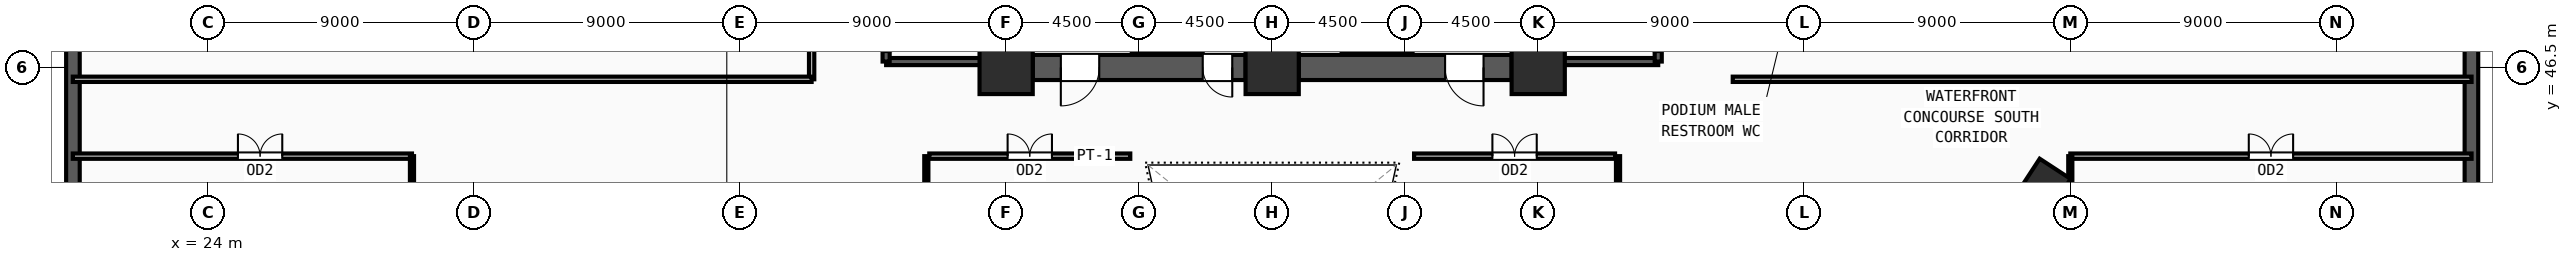
"""IFC4 building model, lengths in metres.
Left out: names, types, materials, properties, quantities, classifications, styles, units other than length and angle.
Written with IfcOpenShell. Run it as: python <this file> out.ifc"""

import sys

from ifc_helpers import new_model, si_unit, direction, frame, frame_2d, origin, origin_2d, place, context, subcontext, project, spatial, rectangle, extrude, source, transform, mapped, element, fill, save


model = new_model("IFC4")
c1 = context("Model", 3, precision=1e-05, world=origin(), true_north=direction((0.0, 1.0)))
c2 = subcontext(c1, "Body", "Model", "MODEL_VIEW")
j1 = project(units=[si_unit("LENGTHUNIT", "METRE"), si_unit("PLANEANGLEUNIT", "RADIAN")], contexts=[c1])
p1 = place(None, origin())
s1 = spatial("IfcSite", under=j1, at=p1, CompositionType="ELEMENT")
p2 = place(p1, origin())
s2 = spatial("IfcBuilding", under=s1, at=p2, CompositionType="ELEMENT")
p3 = place(p2, frame((0.0, 0.0, 14.4)))
s3 = spatial("IfcBuildingStorey", under=s2, at=p3, CompositionType="ELEMENT", Elevation=14.4)
m1 = source(origin(), c2, "Body", "SweptSolid", [
    extrude(rectangle(XDim=1.8, YDim=1.8, at=origin_2d()), origin(), (0.0, 0.0, 1.0), 4.5),
])
for number, where, z_axis, x_axis in (
    (1, (51.0, 46.5, 0.0), (0.0, 0.0, 1.0), (1.0, 0.0, 0.0)),
    (2, (60.0, 46.5, 0.0), (0.0, 0.0, 1.0), (1.0, 0.0, 0.0)),
    (3, (69.0, 46.5, 0.0), (0.0, 0.0, 1.0), (1.0, 0.0, 0.0)),
):
    element("IfcColumn", number, at=place(p3, frame(where, z_axis=z_axis, x_axis=x_axis)), inside=s3, PredefinedType="COLUMN", context=c2, shape_type="MappedRepresentation", body=[
        mapped(m1, transform((0.0, 0.0, 0.0), x_axis=(1.0, 0.0, 0.0), y_axis=(0.0, 1.0, 0.0), z_axis=(0.0, 0.0, 1.0), scale=1.0)),
    ])
m2 = source(origin(), c2, "Body", "SweptSolid", [
    extrude(rectangle(XDim=1.55, YDim=1.25, at=origin_2d()), origin(), (0.0, 0.0, 1.0), 4.5),
])
p4 = place(p3, frame((86.064, 42.423, 0.0), z_axis=(0.0, 0.0, 1.0), x_axis=(0.546978918409, 0.837146380758, 0.0)))
e4 = element("IfcColumn", 4, at=p4, inside=s3, PredefinedType="COLUMN", context=c2, shape_type="MappedRepresentation", body=[
    mapped(m2, transform((0.0, 0.0, 0.0), x_axis=(1.0, 0.0, 0.0), y_axis=(0.0, 1.0, 0.0), z_axis=(0.0, 0.0, 1.0), scale=1.0)),
])
p5 = place(p3, frame((100.57, 20.54, 0.0), z_axis=(0.0, 0.0, 1.0), x_axis=(0.0, 1.0, 0.0)))
e5 = element("IfcWall", 5, at=p5, inside=s3, PredefinedType="SOLIDWALL", context=c2, shape_type="SweptSolid", body=[
    extrude(rectangle(XDim=66.23, YDim=0.46, at=frame_2d((33.115, 0.0))), origin(), (0.0, 0.0, 1.0), 4.25),
])
m3 = source(origin(), c2, "Body", "SweptSolid", [
    extrude(rectangle(XDim=2.7, YDim=2.35, at=frame_2d((1.35, 1.175))), frame((0.0, 0.24, 0.0), z_axis=(0.0, -1.0, 0.0), x_axis=(1.0, 0.0, 0.0)), (0.0, 0.0, 1.0), 0.48),
])
p6 = place(p5, frame((8.111, 0.0, 0.55)))
e6 = element("IfcOpeningElement", 6, at=p6, cuts=e5, PredefinedType="OPENING", context=c2, shape_type="MappedRepresentation", body=[
    mapped(m3, transform((0.0, 0.0, 0.0), x_axis=(1.0, 0.0, 0.0), y_axis=(0.0, 1.0, 0.0), z_axis=(0.0, 0.0, 1.0), scale=1.0)),
])
p7 = place(p5, frame((17.573, 0.0, 0.55)))
e7 = element("IfcOpeningElement", 7, at=p7, cuts=e5, PredefinedType="OPENING", context=c2, shape_type="MappedRepresentation", body=[
    mapped(m3, transform((0.0, 0.0, 0.0), x_axis=(1.0, 0.0, 0.0), y_axis=(0.0, 1.0, 0.0), z_axis=(0.0, 0.0, 1.0), scale=1.0)),
])
p8 = place(p5, frame((27.034, 0.0, 0.55)))
e8 = element("IfcOpeningElement", 8, at=p8, cuts=e5, PredefinedType="OPENING", context=c2, shape_type="MappedRepresentation", body=[
    mapped(m3, transform((0.0, 0.0, 0.0), x_axis=(1.0, 0.0, 0.0), y_axis=(0.0, 1.0, 0.0), z_axis=(0.0, 0.0, 1.0), scale=1.0)),
])
p9 = place(p5, frame((36.496, 0.0, 0.55)))
e9 = element("IfcOpeningElement", 9, at=p9, cuts=e5, PredefinedType="OPENING", context=c2, shape_type="MappedRepresentation", body=[
    mapped(m3, transform((0.0, 0.0, 0.0), x_axis=(1.0, 0.0, 0.0), y_axis=(0.0, 1.0, 0.0), z_axis=(0.0, 0.0, 1.0), scale=1.0)),
])
p10 = place(p5, frame((55.419, 0.0, 0.55)))
e10 = element("IfcOpeningElement", 10, at=p10, cuts=e5, PredefinedType="OPENING", context=c2, shape_type="MappedRepresentation", body=[
    mapped(m3, transform((0.0, 0.0, 0.0), x_axis=(1.0, 0.0, 0.0), y_axis=(0.0, 1.0, 0.0), z_axis=(0.0, 0.0, 1.0), scale=1.0)),
])
p11 = place(p3, frame((19.43, 86.77, 0.0), z_axis=(0.0, 0.0, 1.0), x_axis=(0.0, -1.0, 0.0)))
e11 = element("IfcWall", 11, at=p11, inside=s3, PredefinedType="SOLIDWALL", context=c2, shape_type="SweptSolid", body=[
    extrude(rectangle(XDim=66.23, YDim=0.46, at=frame_2d((33.115, 0.0))), origin(), (0.0, 0.0, 1.0), 4.25),
])
p12 = place(p11, frame((8.111, 0.0, 0.55)))
e12 = element("IfcOpeningElement", 12, at=p12, cuts=e11, PredefinedType="OPENING", context=c2, shape_type="MappedRepresentation", body=[
    mapped(m3, transform((0.0, 0.0, 0.0), x_axis=(1.0, 0.0, 0.0), y_axis=(0.0, 1.0, 0.0), z_axis=(0.0, 0.0, 1.0), scale=1.0)),
])
p13 = place(p11, frame((27.034, 0.0, 0.55)))
e13 = element("IfcOpeningElement", 13, at=p13, cuts=e11, PredefinedType="OPENING", context=c2, shape_type="MappedRepresentation", body=[
    mapped(m3, transform((0.0, 0.0, 0.0), x_axis=(1.0, 0.0, 0.0), y_axis=(0.0, 1.0, 0.0), z_axis=(0.0, 0.0, 1.0), scale=1.0)),
])
p14 = place(p11, frame((36.496, 0.0, 0.55)))
e14 = element("IfcOpeningElement", 14, at=p14, cuts=e11, PredefinedType="OPENING", context=c2, shape_type="MappedRepresentation", body=[
    mapped(m3, transform((0.0, 0.0, 0.0), x_axis=(1.0, 0.0, 0.0), y_axis=(0.0, 1.0, 0.0), z_axis=(0.0, 0.0, 1.0), scale=1.0)),
])
p15 = place(p11, frame((45.957, 0.0, 0.55)))
e15 = element("IfcOpeningElement", 15, at=p15, cuts=e11, PredefinedType="OPENING", context=c2, shape_type="MappedRepresentation", body=[
    mapped(m3, transform((0.0, 0.0, 0.0), x_axis=(1.0, 0.0, 0.0), y_axis=(0.0, 1.0, 0.0), z_axis=(0.0, 0.0, 1.0), scale=1.0)),
])
p16 = place(p11, frame((55.419, 0.0, 0.55)))
e16 = element("IfcOpeningElement", 16, at=p16, cuts=e11, PredefinedType="OPENING", context=c2, shape_type="MappedRepresentation", body=[
    mapped(m3, transform((0.0, 0.0, 0.0), x_axis=(1.0, 0.0, 0.0), y_axis=(0.0, 1.0, 0.0), z_axis=(0.0, 0.0, 1.0), scale=1.0)),
])
p17 = place(p3, frame((68.1, 46.5, 0.0), z_axis=(0.0, 0.0, 1.0), x_axis=(-1.0, 0.0, 0.0)))
e17 = element("IfcWall", 17, at=p17, inside=s3, PredefinedType="SHEAR", context=c2, shape_type="SweptSolid", body=[
    extrude(rectangle(XDim=7.2, YDim=0.85, at=frame_2d((3.6, 0.0))), origin(), (0.0, 0.0, 1.0), 4.25),
])
m4 = source(origin(), c2, "Body", "SweptSolid", [
    extrude(rectangle(XDim=1.3, YDim=2.2, at=frame_2d((0.65, 1.1))), frame((0.0, 0.435, 0.0), z_axis=(0.0, -1.0, 0.0), x_axis=(1.0, 0.0, 0.0)), (0.0, 0.0, 1.0), 0.87),
])
p18 = place(p17, frame((0.95, 0.0, 0.0)))
e18 = element("IfcOpeningElement", 18, at=p18, cuts=e17, PredefinedType="OPENING", context=c2, shape_type="MappedRepresentation", body=[
    mapped(m4, transform((0.0, 0.0, 0.0), x_axis=(1.0, 0.0, 0.0), y_axis=(0.0, 1.0, 0.0), z_axis=(0.0, 0.0, 1.0), scale=1.0)),
])
p19 = place(p3, frame((59.1, 46.5, 0.0), z_axis=(0.0, 0.0, 1.0), x_axis=(-1.0, 0.0, 0.0)))
e19 = element("IfcWall", 19, at=p19, inside=s3, PredefinedType="SHEAR", context=c2, shape_type="SweptSolid", body=[
    extrude(rectangle(XDim=7.2, YDim=0.85, at=frame_2d((3.6, 0.0))), origin(), (0.0, 0.0, 1.0), 4.25),
])
p20 = place(p19, frame((4.95, 0.0, 0.0)))
e20 = element("IfcOpeningElement", 20, at=p20, cuts=e19, PredefinedType="OPENING", context=c2, shape_type="MappedRepresentation", body=[
    mapped(m4, transform((0.0, 0.0, 0.0), x_axis=(1.0, 0.0, 0.0), y_axis=(0.0, 1.0, 0.0), z_axis=(0.0, 0.0, 1.0), scale=1.0)),
])
m5 = source(origin(), c2, "Body", "SweptSolid", [
    extrude(rectangle(XDim=1.0, YDim=2.2, at=frame_2d((0.5, 1.1))), frame((0.0, 0.435, 0.0), z_axis=(0.0, -1.0, 0.0), x_axis=(1.0, 0.0, 0.0)), (0.0, 0.0, 1.0), 0.87),
])
p21 = place(p19, frame((0.45, 0.0, 0.0)))
e21 = element("IfcOpeningElement", 21, at=p21, cuts=e19, PredefinedType="OPENING", context=c2, shape_type="MappedRepresentation", body=[
    mapped(m5, transform((0.0, 0.0, 0.0), x_axis=(1.0, 0.0, 0.0), y_axis=(0.0, 1.0, 0.0), z_axis=(0.0, 0.0, 1.0), scale=1.0)),
])
p22 = place(p3, frame((46.94, 46.7, 0.0), z_axis=(0.0, 0.0, 1.0), x_axis=(1.0, 0.0, 0.0)))
e22 = element("IfcWall", 22, at=p22, inside=s3, PredefinedType="SOLIDWALL", context=c2, shape_type="SweptSolid", body=[
    extrude(rectangle(XDim=3.44, YDim=0.24, at=frame_2d((1.72, 0.0))), origin(), (0.0, 0.0, 1.0), 4.25),
])
p23 = place(p3, frame((50.38, 46.7, 0.0), z_axis=(0.0, 0.0, 1.0), x_axis=(0.0, 1.0, 0.0)))
e23 = element("IfcWall", 23, at=p23, inside=s3, PredefinedType="SOLIDWALL", context=c2, shape_type="SweptSolid", body=[
    extrude(rectangle(XDim=7.82, YDim=0.24, at=frame_2d((3.91, 0.0))), origin(), (0.0, 0.0, 1.0), 4.25),
])
p24 = place(p3, frame((46.94, 54.52, 0.0), z_axis=(0.0, 0.0, 1.0), x_axis=(0.0, -1.0, 0.0)))
e24 = element("IfcWall", 24, at=p24, inside=s3, PredefinedType="SOLIDWALL", context=c2, shape_type="SweptSolid", body=[
    extrude(rectangle(XDim=7.82, YDim=0.24, at=frame_2d((3.91, 0.0))), origin(), (0.0, 0.0, 1.0), 4.25),
])
m6 = source(origin(), c2, "Body", "SweptSolid", [
    extrude(rectangle(XDim=1.2, YDim=2.2, at=frame_2d((0.6, 1.1))), frame((0.0, 0.13, 0.0), z_axis=(0.0, -1.0, 0.0), x_axis=(1.0, 0.0, 0.0)), (0.0, 0.0, 1.0), 0.26),
])
p25 = place(p24, frame((6.3, 0.0, 0.0)))
e25 = element("IfcOpeningElement", 25, at=p25, cuts=e24, PredefinedType="OPENING", context=c2, shape_type="MappedRepresentation", body=[
    mapped(m6, transform((0.0, 0.0, 0.0), x_axis=(1.0, 0.0, 0.0), y_axis=(0.0, 1.0, 0.0), z_axis=(0.0, 0.0, 1.0), scale=1.0)),
])
p26 = place(p3, frame((69.62, 46.7, 0.0), z_axis=(0.0, 0.0, 1.0), x_axis=(1.0, 0.0, 0.0)))
e26 = element("IfcWall", 26, at=p26, inside=s3, PredefinedType="SOLIDWALL", context=c2, shape_type="SweptSolid", body=[
    extrude(rectangle(XDim=3.44, YDim=0.24, at=frame_2d((1.72, 0.0))), origin(), (0.0, 0.0, 1.0), 4.25),
])
p27 = place(p3, frame((73.06, 46.7, 0.0), z_axis=(0.0, 0.0, 1.0), x_axis=(0.0, 1.0, 0.0)))
e27 = element("IfcWall", 27, at=p27, inside=s3, PredefinedType="SOLIDWALL", context=c2, shape_type="SweptSolid", body=[
    extrude(rectangle(XDim=7.82, YDim=0.24, at=frame_2d((3.91, 0.0))), origin(), (0.0, 0.0, 1.0), 4.25),
])
p28 = place(p27, frame((0.32, 0.0, 0.0)))
e28 = element("IfcOpeningElement", 28, at=p28, cuts=e27, PredefinedType="OPENING", context=c2, shape_type="MappedRepresentation", body=[
    mapped(m6, transform((0.0, 0.0, 0.0), x_axis=(1.0, 0.0, 0.0), y_axis=(0.0, 1.0, 0.0), z_axis=(0.0, 0.0, 1.0), scale=1.0)),
])
p29 = place(p3, frame((69.62, 54.52, 0.0), z_axis=(0.0, 0.0, 1.0), x_axis=(0.0, -1.0, 0.0)))
e29 = element("IfcWall", 29, at=p29, inside=s3, PredefinedType="SOLIDWALL", context=c2, shape_type="SweptSolid", body=[
    extrude(rectangle(XDim=7.82, YDim=0.24, at=frame_2d((3.91, 0.0))), origin(), (0.0, 0.0, 1.0), 4.25),
])
p30 = place(p3, frame((48.4, 43.5, 0.0), z_axis=(0.0, 0.0, 1.0), x_axis=(1.0, 0.0, 0.0)))
e30 = element("IfcWall", 30, at=p30, inside=s3, PredefinedType="PARTITIONING", context=c2, shape_type="SweptSolid", body=[
    extrude(rectangle(XDim=6.8, YDim=0.18, at=frame_2d((3.4, 0.0))), origin(), (0.0, 0.0, 1.0), 4.25),
])
m7 = source(origin(), c2, "Body", "SweptSolid", [
    extrude(rectangle(XDim=1.5, YDim=2.2, at=frame_2d((0.75, 1.1))), frame((0.0, 0.1, 0.0), z_axis=(0.0, -1.0, 0.0), x_axis=(1.0, 0.0, 0.0)), (0.0, 0.0, 1.0), 0.2),
])
p31 = place(p30, frame((2.65, 0.0, 0.0)))
e31 = element("IfcOpeningElement", 31, at=p31, cuts=e30, PredefinedType="OPENING", context=c2, shape_type="MappedRepresentation", body=[
    mapped(m7, transform((0.0, 0.0, 0.0), x_axis=(1.0, 0.0, 0.0), y_axis=(0.0, 1.0, 0.0), z_axis=(0.0, 0.0, 1.0), scale=1.0)),
])
p32 = place(p3, frame((64.8, 43.5, 0.0), z_axis=(0.0, 0.0, 1.0), x_axis=(1.0, 0.0, 0.0)))
e32 = element("IfcWall", 32, at=p32, inside=s3, PredefinedType="PARTITIONING", context=c2, shape_type="SweptSolid", body=[
    extrude(rectangle(XDim=6.8, YDim=0.18, at=frame_2d((3.4, 0.0))), origin(), (0.0, 0.0, 1.0), 4.25),
])
p33 = place(p32, frame((2.65, 0.0, 0.0)))
e33 = element("IfcOpeningElement", 33, at=p33, cuts=e32, PredefinedType="OPENING", context=c2, shape_type="MappedRepresentation", body=[
    mapped(m7, transform((0.0, 0.0, 0.0), x_axis=(1.0, 0.0, 0.0), y_axis=(0.0, 1.0, 0.0), z_axis=(0.0, 0.0, 1.0), scale=1.0)),
])
p34 = place(p3, frame((19.425, 43.5, 0.0), z_axis=(0.0, 0.0, 1.0), x_axis=(1.0, 0.0, 0.0)))
e34 = element("IfcWall", 34, at=p34, inside=s3, PredefinedType="PARTITIONING", context=c2, shape_type="SweptSolid", body=[
    extrude(rectangle(XDim=11.475, YDim=0.18, at=frame_2d((5.737, 0.0))), origin(), (0.0, 0.0, 1.0), 4.25),
])
p35 = place(p34, frame((5.587, 0.0, 0.0)))
e35 = element("IfcOpeningElement", 35, at=p35, cuts=e34, PredefinedType="OPENING", context=c2, shape_type="MappedRepresentation", body=[
    mapped(m7, transform((0.0, 0.0, 0.0), x_axis=(1.0, 0.0, 0.0), y_axis=(0.0, 1.0, 0.0), z_axis=(0.0, 0.0, 1.0), scale=1.0)),
])
p36 = place(p3, frame((87.0, 43.5, 0.0), z_axis=(0.0, 0.0, 1.0), x_axis=(1.0, 0.0, 0.0)))
e36 = element("IfcWall", 36, at=p36, inside=s3, PredefinedType="PARTITIONING", context=c2, shape_type="SweptSolid", body=[
    extrude(rectangle(XDim=13.575, YDim=0.18, at=frame_2d((6.788, 0.0))), origin(), (0.0, 0.0, 1.0), 4.25),
])
p37 = place(p36, frame((6.038, 0.0, 0.0)))
e37 = element("IfcOpeningElement", 37, at=p37, cuts=e36, PredefinedType="OPENING", context=c2, shape_type="MappedRepresentation", body=[
    mapped(m7, transform((0.0, 0.0, 0.0), x_axis=(1.0, 0.0, 0.0), y_axis=(0.0, 1.0, 0.0), z_axis=(0.0, 0.0, 1.0), scale=1.0)),
])
p38 = place(p3, frame((44.42, 46.1, 0.0), z_axis=(0.0, 0.0, 1.0), x_axis=(0.0, 1.0, 0.0)))
e38 = element("IfcWall", 38, at=p38, inside=s3, PredefinedType="PARTITIONING", context=c2, shape_type="SweptSolid", body=[
    extrude(rectangle(XDim=22.0, YDim=0.18, at=frame_2d((11.0, 0.0))), origin(), (0.0, 0.0, 1.0), 4.25),
])
p39 = place(p38, frame((10.25, 0.0, 0.0)))
e39 = element("IfcOpeningElement", 39, at=p39, cuts=e38, PredefinedType="OPENING", context=c2, shape_type="MappedRepresentation", body=[
    mapped(m7, transform((0.0, 0.0, 0.0), x_axis=(1.0, 0.0, 0.0), y_axis=(0.0, 1.0, 0.0), z_axis=(0.0, 0.0, 1.0), scale=1.0)),
])
for number, where, z_axis, x_axis in (
    (40, (19.425, 46.1, 0.0), (0.0, 0.0, 1.0), (1.0, 0.0, 0.0)),
    (41, (75.58, 46.1, 0.0), (0.0, 0.0, 1.0), (1.0, 0.0, 0.0)),
):
    element("IfcWall", number, at=place(p3, frame(where, z_axis=z_axis, x_axis=x_axis)), inside=s3, PredefinedType="PARTITIONING", context=c2, shape_type="SweptSolid", body=[
        extrude(rectangle(XDim=24.995, YDim=0.18, at=frame_2d((12.498, 0.0))), origin(), (0.0, 0.0, 1.0), 4.25),
    ])
for number, where, z_axis, x_axis in (
    (42, (30.9, 19.425, 0.0), (0.0, 0.0, 1.0), (0.0, 1.0, 0.0)),
    (43, (87.0, 19.425, 0.0), (0.0, 0.0, 1.0), (0.0, 1.0, 0.0)),
    (44, (48.3, 19.425, 0.0), (0.0, 0.0, 1.0), (0.0, 1.0, 0.0)),
    (45, (71.7, 19.425, 0.0), (0.0, 0.0, 1.0), (0.0, 1.0, 0.0)),
):
    element("IfcWall", number, at=place(p3, frame(where, z_axis=z_axis, x_axis=x_axis)), inside=s3, PredefinedType="PARTITIONING", context=c2, shape_type="SweptSolid", body=[
        extrude(rectangle(XDim=24.075, YDim=0.14, at=frame_2d((12.038, 0.0))), origin(), (0.0, 0.0, 1.0), 4.25),
    ])
m8 = source(origin(), c2, "Body", "SweptSolid", [
    extrude(rectangle(XDim=1.3, YDim=2.2, at=frame_2d((0.65, 1.1))), frame((0.0, 0.025, 0.0), z_axis=(0.0, -1.0, 0.0), x_axis=(1.0, 0.0, 0.0)), (0.0, 0.0, 1.0), 0.05),
])
p40 = place(p20, origin())
e46 = element("IfcDoor", 46, at=p40, inside=s3, OperationType="SINGLE_SWING_RIGHT", PredefinedType="DOOR", context=c2, shape_type="MappedRepresentation", body=[
    mapped(m8, transform((0.0, 0.0, 0.0), x_axis=(1.0, 0.0, 0.0), y_axis=(0.0, 1.0, 0.0), z_axis=(0.0, 0.0, 1.0), scale=1.0)),
])
fill(e20, e46)
m9 = source(origin(), c2, "Body", "SweptSolid", [
    extrude(rectangle(XDim=1.0, YDim=2.2, at=frame_2d((0.5, 1.1))), frame((0.0, 0.025, 0.0), z_axis=(0.0, -1.0, 0.0), x_axis=(1.0, 0.0, 0.0)), (0.0, 0.0, 1.0), 0.05),
])
p41 = place(p21, origin())
e47 = element("IfcDoor", 47, at=p41, inside=s3, OperationType="SINGLE_SWING_LEFT", PredefinedType="DOOR", context=c2, shape_type="MappedRepresentation", body=[
    mapped(m9, transform((0.0, 0.0, 0.0), x_axis=(1.0, 0.0, 0.0), y_axis=(0.0, 1.0, 0.0), z_axis=(0.0, 0.0, 1.0), scale=1.0)),
])
fill(e21, e47)
p42 = place(p18, origin())
e48 = element("IfcDoor", 48, at=p42, inside=s3, OperationType="SINGLE_SWING_LEFT", PredefinedType="DOOR", context=c2, shape_type="MappedRepresentation", body=[
    mapped(m8, transform((0.0, 0.0, 0.0), x_axis=(1.0, 0.0, 0.0), y_axis=(0.0, 1.0, 0.0), z_axis=(0.0, 0.0, 1.0), scale=1.0)),
])
fill(e18, e48)
m10 = source(origin(), c2, "Body", "SweptSolid", [
    extrude(rectangle(XDim=1.5, YDim=2.2, at=frame_2d((0.75, 1.1))), frame((0.0, 0.025, 0.0), z_axis=(0.0, -1.0, 0.0), x_axis=(1.0, 0.0, 0.0)), (0.0, 0.0, 1.0), 0.05),
])
p43 = place(p31, origin())
e49 = element("IfcDoor", 49, at=p43, inside=s3, OperationType="DOUBLE_DOOR_SINGLE_SWING", PredefinedType="DOOR", context=c2, shape_type="MappedRepresentation", body=[
    mapped(m10, transform((0.0, 0.0, 0.0), x_axis=(1.0, 0.0, 0.0), y_axis=(0.0, 1.0, 0.0), z_axis=(0.0, 0.0, 1.0), scale=1.0)),
])
fill(e31, e49)
p44 = place(p33, origin())
e50 = element("IfcDoor", 50, at=p44, inside=s3, OperationType="DOUBLE_DOOR_SINGLE_SWING", PredefinedType="DOOR", context=c2, shape_type="MappedRepresentation", body=[
    mapped(m10, transform((0.0, 0.0, 0.0), x_axis=(1.0, 0.0, 0.0), y_axis=(0.0, 1.0, 0.0), z_axis=(0.0, 0.0, 1.0), scale=1.0)),
])
fill(e33, e50)
p45 = place(p35, origin())
e51 = element("IfcDoor", 51, at=p45, inside=s3, OperationType="DOUBLE_DOOR_SINGLE_SWING", PredefinedType="DOOR", context=c2, shape_type="MappedRepresentation", body=[
    mapped(m10, transform((0.0, 0.0, 0.0), x_axis=(1.0, 0.0, 0.0), y_axis=(0.0, 1.0, 0.0), z_axis=(0.0, 0.0, 1.0), scale=1.0)),
])
fill(e35, e51)
p46 = place(p37, origin())
e52 = element("IfcDoor", 52, at=p46, inside=s3, OperationType="DOUBLE_DOOR_SINGLE_SWING", PredefinedType="DOOR", context=c2, shape_type="MappedRepresentation", body=[
    mapped(m10, transform((0.0, 0.0, 0.0), x_axis=(1.0, 0.0, 0.0), y_axis=(0.0, 1.0, 0.0), z_axis=(0.0, 0.0, 1.0), scale=1.0)),
])
fill(e37, e52)
save(model, sys.argv[1])
